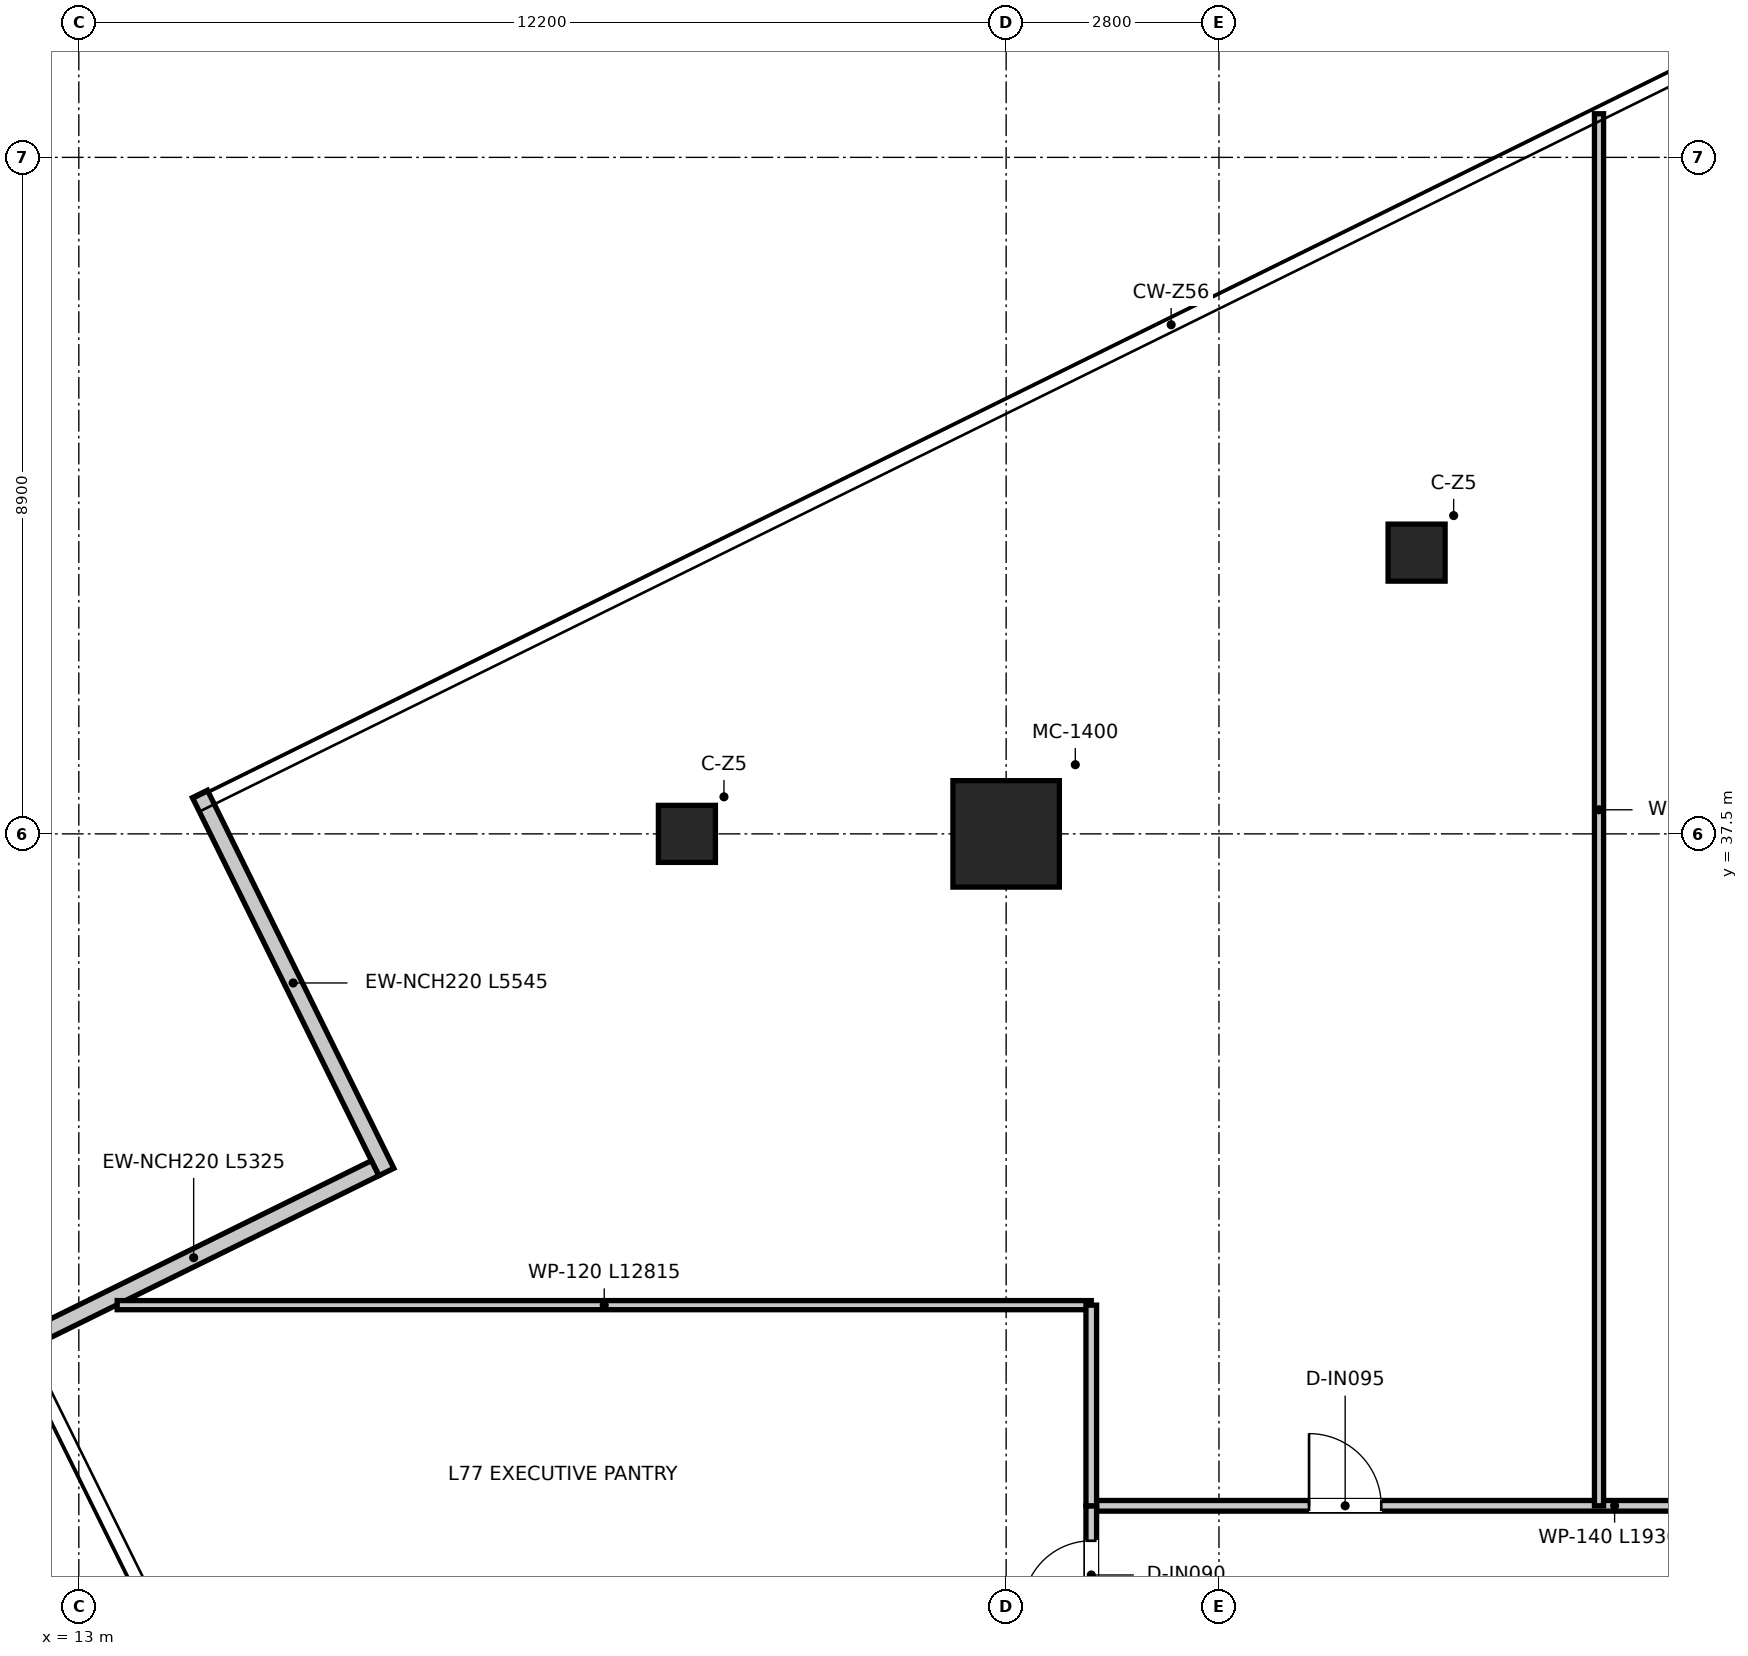
"""IFC4 building model, lengths in metres.
Left out: names, types, materials, properties, quantities, classifications, styles, units other than length and angle.
Written with IfcOpenShell. Run it as: python <this file> out.ifc"""

import sys

from ifc_helpers import new_model, si_unit, direction, frame, frame_2d, origin, origin_2d, place, context, subcontext, project, spatial, rectangle, extrude, source, transform, mapped, element, fill, save


model = new_model("IFC4")
c1 = context("Model", 3, precision=1e-05, world=origin(), true_north=direction((0.0, 1.0)))
c2 = subcontext(c1, "Body", "Model", "MODEL_VIEW")
j1 = project(units=[si_unit("LENGTHUNIT", "METRE"), si_unit("PLANEANGLEUNIT", "RADIAN")], contexts=[c1])
p1 = place(None, origin())
s1 = spatial("IfcSite", under=j1, at=p1, CompositionType="ELEMENT")
p2 = place(p1, origin())
s2 = spatial("IfcBuilding", under=s1, at=p2, CompositionType="ELEMENT")
p3 = place(p2, frame((0.0, 0.0, 314.8)))
s3 = spatial("IfcBuildingStorey", under=s2, at=p3, CompositionType="ELEMENT", Elevation=314.8)
m1 = source(origin(), c2, "Body", "SweptSolid", [
    extrude(rectangle(XDim=1.4, YDim=1.4, at=origin_2d()), origin(), (0.0, 0.0, 1.0), 3.95),
])
p4 = place(p3, frame((25.2, 37.5, 0.0), z_axis=(0.0, 0.0, 1.0), x_axis=(1.0, 0.0, 0.0)))
e1 = element("IfcColumn", 1, at=p4, inside=s3, PredefinedType="USERDEFINED", context=c2, shape_type="MappedRepresentation", body=[
    mapped(m1, transform((0.0, 0.0, 0.0), x_axis=(1.0, 0.0, 0.0), y_axis=(0.0, 1.0, 0.0), z_axis=(0.0, 0.0, 1.0), scale=1.0)),
])
m2 = source(origin(), c2, "Body", "SweptSolid", [
    extrude(rectangle(XDim=0.75, YDim=0.75, at=origin_2d()), origin(), (0.0, 0.0, 1.0), 3.95),
])
for number, where, z_axis, x_axis in (
    (2, (21.0, 37.5, 0.0), (0.0, 0.0, 1.0), (1.0, 0.0, 0.0)),
    (3, (30.6, 41.2, 0.0), (0.0, 0.0, 1.0), (1.0, 0.0, 0.0)),
):
    element("IfcColumn", number, at=place(p3, frame(where, z_axis=z_axis, x_axis=x_axis)), inside=s3, PredefinedType="COLUMN", context=c2, shape_type="MappedRepresentation", body=[
        mapped(m2, transform((0.0, 0.0, 0.0), x_axis=(1.0, 0.0, 0.0), y_axis=(0.0, 1.0, 0.0), z_axis=(0.0, 0.0, 1.0), scale=1.0)),
    ])
p5 = place(p3, frame((14.594, 38.025, 0.0), z_axis=(0.0, 0.0, 1.0), x_axis=(0.442275503639, -0.896879244314, 0.0)))
e4 = element("IfcWall", 4, at=p5, inside=s3, PredefinedType="ELEMENTEDWALL", context=c2, shape_type="SweptSolid", body=[
    extrude(rectangle(XDim=5.545, YDim=0.22, at=frame_2d((2.772, 0.0))), origin(), (0.0, 0.0, 1.0), 3.59),
])
p6 = place(p3, frame((16.899, 33.102, 0.0), z_axis=(0.0, 0.0, 1.0), x_axis=(-0.896889306105, -0.442255099003, 0.0)))
e5 = element("IfcWall", 5, at=p6, inside=s3, PredefinedType="ELEMENTEDWALL", context=c2, shape_type="SweptSolid", body=[
    extrude(rectangle(XDim=5.325, YDim=0.22, at=frame_2d((2.663, 0.0))), origin(), (0.0, 0.0, 1.0), 3.59),
])
p7 = place(p3, frame((26.32, 28.66, 0.0), z_axis=(0.0, 0.0, 1.0), x_axis=(1.0, 0.0, 0.0)))
e6 = element("IfcWall", 6, at=p7, inside=s3, PredefinedType="PARTITIONING", context=c2, shape_type="SweptSolid", body=[
    extrude(rectangle(XDim=19.36, YDim=0.14, at=frame_2d((9.68, 0.0))), origin(), (0.0, 0.0, 1.0), 3.1),
])
p8 = place(p7, frame((2.865, 0.0, 0.0)))
e7 = element("IfcOpeningElement", 7, at=p8, cuts=e6, PredefinedType="OPENING", context=c2, shape_type="SweptSolid", body=[
    extrude(rectangle(XDim=0.95, YDim=2.1, at=frame_2d((0.475, 1.05))), frame((0.0, 0.08, 0.0), z_axis=(0.0, -1.0, 0.0), x_axis=(1.0, 0.0, 0.0)), (0.0, 0.0, 1.0), 0.16),
])
p9 = place(p7, frame((9.955, 0.0, 0.0)))
e8 = element("IfcOpeningElement", 8, at=p9, cuts=e6, PredefinedType="OPENING", context=c2, shape_type="SweptSolid", body=[
    extrude(rectangle(XDim=0.95, YDim=2.1, at=frame_2d((0.475, 1.05))), frame((0.0, 0.08, 0.0), z_axis=(0.0, -1.0, 0.0), x_axis=(1.0, 0.0, 0.0)), (0.0, 0.0, 1.0), 0.16),
])
p10 = place(p7, frame((16.295, 0.0, 0.0)))
e9 = element("IfcOpeningElement", 9, at=p10, cuts=e6, PredefinedType="OPENING", context=c2, shape_type="SweptSolid", body=[
    extrude(rectangle(XDim=0.95, YDim=2.1, at=frame_2d((0.475, 1.05))), frame((0.0, 0.08, 0.0), z_axis=(0.0, -1.0, 0.0), x_axis=(1.0, 0.0, 0.0)), (0.0, 0.0, 1.0), 0.16),
])
p11 = place(p3, frame((26.32, 9.0, 0.0), z_axis=(0.0, 0.0, 1.0), x_axis=(0.0, 1.0, 0.0)))
e10 = element("IfcWall", 10, at=p11, inside=s3, PredefinedType="PARTITIONING", context=c2, shape_type="SweptSolid", body=[
    extrude(rectangle(XDim=19.66, YDim=0.14, at=frame_2d((9.83, 0.0))), origin(), (0.0, 0.0, 1.0), 3.05),
])
p12 = place(p11, frame((18.3, 0.0, 0.0)))
e11 = element("IfcOpeningElement", 11, at=p12, cuts=e10, PredefinedType="OPENING", context=c2, shape_type="SweptSolid", body=[
    extrude(rectangle(XDim=0.9, YDim=2.1, at=frame_2d((0.45, 1.05))), frame((0.0, 0.08, 0.0), z_axis=(0.0, -1.0, 0.0), x_axis=(1.0, 0.0, 0.0)), (0.0, 0.0, 1.0), 0.16),
])
p13 = place(p11, frame((1.95, 0.0, 0.0)))
e12 = element("IfcOpeningElement", 12, at=p13, cuts=e10, PredefinedType="OPENING", context=c2, shape_type="SweptSolid", body=[
    extrude(rectangle(XDim=0.9, YDim=2.1, at=frame_2d((0.45, 1.05))), frame((0.0, 0.08, 0.0), z_axis=(0.0, -1.0, 0.0), x_axis=(1.0, 0.0, 0.0)), (0.0, 0.0, 1.0), 0.16),
])
p14 = place(p11, frame((10.2, 0.0, 0.0)))
e13 = element("IfcOpeningElement", 13, at=p14, cuts=e10, PredefinedType="OPENING", context=c2, shape_type="SweptSolid", body=[
    extrude(rectangle(XDim=0.9, YDim=2.1, at=frame_2d((0.45, 1.05))), frame((0.0, 0.08, 0.0), z_axis=(0.0, -1.0, 0.0), x_axis=(1.0, 0.0, 0.0)), (0.0, 0.0, 1.0), 0.16),
])
p15 = place(p11, frame((14.86, 0.0, 0.0)))
e14 = element("IfcOpeningElement", 14, at=p15, cuts=e10, PredefinedType="OPENING", context=c2, shape_type="SweptSolid", body=[
    extrude(rectangle(XDim=0.9, YDim=2.1, at=frame_2d((0.45, 1.05))), frame((0.0, 0.08, 0.0), z_axis=(0.0, -1.0, 0.0), x_axis=(1.0, 0.0, 0.0)), (0.0, 0.0, 1.0), 0.16),
])
p16 = place(p3, frame((13.505, 31.3, 0.0), z_axis=(0.0, 0.0, 1.0), x_axis=(1.0, 0.0, 0.0)))
e15 = element("IfcWall", 15, at=p16, inside=s3, PredefinedType="PARTITIONING", context=c2, shape_type="SweptSolid", body=[
    extrude(rectangle(XDim=12.815, YDim=0.12, at=frame_2d((6.408, 0.0))), origin(), (0.0, 0.0, 1.0), 3.05),
])
p17 = place(p3, frame((26.32, 28.66, 0.0), z_axis=(0.0, 0.0, 1.0), x_axis=(0.0, 1.0, 0.0)))
e16 = element("IfcWall", 16, at=p17, inside=s3, PredefinedType="PARTITIONING", context=c2, shape_type="SweptSolid", body=[
    extrude(rectangle(XDim=2.64, YDim=0.14, at=frame_2d((1.32, 0.0))), origin(), (0.0, 0.0, 1.0), 3.35),
])
p18 = place(p3, frame((33.0, 28.66, 0.0), z_axis=(0.0, 0.0, 1.0), x_axis=(0.0, 1.0, 0.0)))
e17 = element("IfcWall", 17, at=p18, inside=s3, PredefinedType="PARTITIONING", context=c2, shape_type="SweptSolid", body=[
    extrude(rectangle(XDim=18.314, YDim=0.12, at=frame_2d((9.157, 0.0))), origin(), (0.0, 0.0, 1.0), 3.05),
])
p19 = place(p12, origin())
e18 = element("IfcDoor", 18, at=p19, inside=s3, OperationType="SINGLE_SWING_LEFT", PredefinedType="DOOR", context=c2, shape_type="SweptSolid", body=[
    extrude(rectangle(XDim=0.9, YDim=2.1, at=frame_2d((0.45, 1.05))), frame((0.0, 0.025, 0.0), z_axis=(0.0, -1.0, 0.0), x_axis=(1.0, 0.0, 0.0)), (0.0, 0.0, 1.0), 0.05),
])
fill(e11, e18)
p20 = place(p8, origin())
e19 = element("IfcDoor", 19, at=p20, inside=s3, OperationType="SINGLE_SWING_LEFT", PredefinedType="DOOR", context=c2, shape_type="SweptSolid", body=[
    extrude(rectangle(XDim=0.95, YDim=2.1, at=frame_2d((0.475, 1.05))), frame((0.0, 0.025, 0.0), z_axis=(0.0, -1.0, 0.0), x_axis=(1.0, 0.0, 0.0)), (0.0, 0.0, 1.0), 0.05),
])
fill(e7, e19)
save(model, sys.argv[1])
